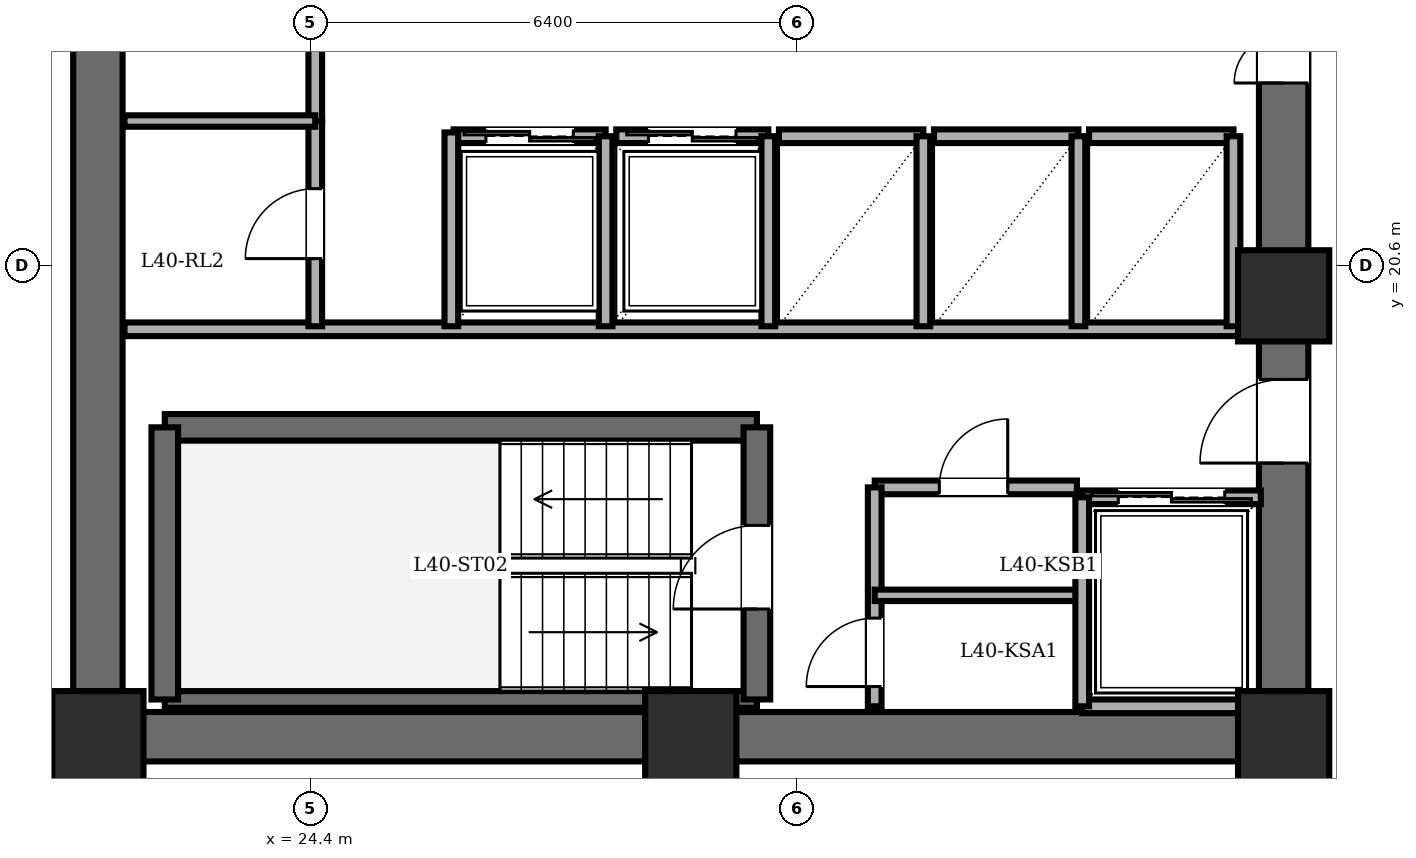
"""IFC4 building model, lengths in metres.
Left out: names, types, materials, properties, quantities, classifications, styles, units other than length and angle.
Written with IfcOpenShell. Run it as: python <this file> out.ifc"""

import sys

from ifc_helpers import new_model, si_unit, direction, frame, frame_2d, origin, origin_2d, place, context, subcontext, project, spatial, rectangle, extrude, element, fill, save


model = new_model("IFC4")
c1 = context("Model", 3, precision=1e-05, world=origin(), true_north=direction((0.0, 1.0)))
c2 = subcontext(c1, "Body", "Model", "MODEL_VIEW")
j1 = project(units=[si_unit("LENGTHUNIT", "METRE"), si_unit("PLANEANGLEUNIT", "RADIAN")], contexts=[c1])
p1 = place(None, origin())
s1 = spatial("IfcSite", under=j1, at=p1, CompositionType="ELEMENT")
p2 = place(p1, origin())
s2 = spatial("IfcBuilding", under=s1, at=p2, CompositionType="ELEMENT")
p3 = place(p2, frame((0.0, 0.0, 154.6)))
s3 = spatial("IfcBuildingStorey", under=s2, at=p3, CompositionType="ELEMENT", Elevation=154.6)
for number, where, z_axis, x_axis in (
    (1, (21.6, 14.4, 0.0), (0.0, 0.0, 1.0), (1.0, 0.0, 0.0)),
    (2, (29.4, 14.4, 0.0), (0.0, 0.0, 1.0), (1.0, 0.0, 0.0)),
    (3, (37.2, 14.4, 0.0), (0.0, 0.0, 1.0), (1.0, 0.0, 0.0)),
    (4, (37.2, 20.2, 0.0), (0.0, 0.0, 1.0), (1.0, 0.0, 0.0)),
):
    element("IfcColumn", number, at=place(p3, frame(where, z_axis=z_axis, x_axis=x_axis)), inside=s3, PredefinedType="COLUMN", context=c2, shape_type="SweptSolid", body=[
        extrude(rectangle(XDim=1.2, YDim=1.2, at=origin_2d()), origin(), (0.0, 0.0, 1.0), 3.6),
    ])
p4 = place(p3, frame((21.6, 14.4, 0.0), z_axis=(0.0, 0.0, 1.0), x_axis=(0.0, 1.0, 0.0)))
e5 = element("IfcWall", 5, at=p4, inside=s3, PredefinedType="SHEAR", context=c2, shape_type="SweptSolid", body=[
    extrude(rectangle(XDim=19.2, YDim=0.65, at=frame_2d((9.6, 0.0))), origin(), (0.0, 0.0, 1.0), 3.4),
])
p5 = place(p3, frame((37.2, 14.4, 0.0), z_axis=(0.0, 0.0, 1.0), x_axis=(-1.0, 0.0, 0.0)))
e6 = element("IfcWall", 6, at=p5, inside=s3, PredefinedType="SHEAR", context=c2, shape_type="SweptSolid", body=[
    extrude(rectangle(XDim=15.6, YDim=0.65, at=frame_2d((7.8, 0.0))), origin(), (0.0, 0.0, 1.0), 3.4),
])
p6 = place(p3, frame((37.2, 14.4, 0.0), z_axis=(0.0, 0.0, 1.0), x_axis=(0.0, 1.0, 0.0)))
e7 = element("IfcWall", 7, at=p6, inside=s3, PredefinedType="SHEAR", context=c2, shape_type="SweptSolid", body=[
    extrude(rectangle(XDim=19.2, YDim=0.65, at=frame_2d((9.6, 0.0))), origin(), (0.0, 0.0, 1.0), 3.4),
])
p7 = place(p6, frame((15.8, 0.0, 0.0)))
e8 = element("IfcOpeningElement", 8, at=p7, cuts=e7, PredefinedType="OPENING", context=c2, shape_type="SweptSolid", body=[
    extrude(rectangle(XDim=1.15, YDim=2.15, at=frame_2d((0.575, 1.075))), frame((0.0, 0.335, 0.0), z_axis=(0.0, -1.0, 0.0), x_axis=(1.0, 0.0, 0.0)), (0.0, 0.0, 1.0), 0.67),
])
p8 = place(p6, frame((3.6, 0.0, 0.0)))
e9 = element("IfcOpeningElement", 9, at=p8, cuts=e7, PredefinedType="OPENING", context=c2, shape_type="SweptSolid", body=[
    extrude(rectangle(XDim=1.1, YDim=2.15, at=frame_2d((0.55, 1.075))), frame((0.0, 0.335, 0.0), z_axis=(0.0, -1.0, 0.0), x_axis=(1.0, 0.0, 0.0)), (0.0, 0.0, 1.0), 0.67),
])
p9 = place(p6, frame((8.6, 0.0, 0.0)))
e10 = element("IfcOpeningElement", 10, at=p9, cuts=e7, PredefinedType="OPENING", context=c2, shape_type="SweptSolid", body=[
    extrude(rectangle(XDim=1.3, YDim=2.2, at=frame_2d((0.65, 1.1))), frame((0.0, 0.335, 0.0), z_axis=(0.0, -1.0, 0.0), x_axis=(1.0, 0.0, 0.0)), (0.0, 0.0, 1.0), 0.67),
])
p10 = place(p3, frame((22.48, 18.47, 0.0), z_axis=(0.0, 0.0, 1.0), x_axis=(1.0, 0.0, 0.0)))
e11 = element("IfcWall", 11, at=p10, inside=s3, PredefinedType="SOLIDWALL", context=c2, shape_type="SweptSolid", body=[
    extrude(rectangle(XDim=7.79, YDim=0.35, at=frame_2d((3.895, 0.0))), origin(), (0.0, 0.0, 1.0), 3.4),
])
p11 = place(p3, frame((22.48, 14.89, 0.0), z_axis=(0.0, 0.0, 1.0), x_axis=(1.0, 0.0, 0.0)))
e12 = element("IfcWall", 12, at=p11, inside=s3, PredefinedType="PARTITIONING", context=c2, shape_type="SweptSolid", body=[
    extrude(rectangle(XDim=7.79, YDim=0.22, at=frame_2d((3.895, 0.0))), origin(), (0.0, 0.0, 1.0), 3.4),
])
p12 = place(p3, frame((22.48, 14.89, 0.0), z_axis=(0.0, 0.0, 1.0), x_axis=(0.0, 1.0, 0.0)))
e13 = element("IfcWall", 13, at=p12, inside=s3, PredefinedType="SOLIDWALL", context=c2, shape_type="SweptSolid", body=[
    extrude(rectangle(XDim=3.58, YDim=0.35, at=frame_2d((1.79, 0.0))), origin(), (0.0, 0.0, 1.0), 3.4),
])
p13 = place(p3, frame((30.27, 14.89, 0.0), z_axis=(0.0, 0.0, 1.0), x_axis=(0.0, 1.0, 0.0)))
e14 = element("IfcWall", 14, at=p13, inside=s3, PredefinedType="SOLIDWALL", context=c2, shape_type="SweptSolid", body=[
    extrude(rectangle(XDim=3.58, YDim=0.35, at=frame_2d((1.79, 0.0))), origin(), (0.0, 0.0, 1.0), 3.4),
])
p14 = place(p13, frame((1.19, 0.0, 0.0)))
e15 = element("IfcOpeningElement", 15, at=p14, cuts=e14, PredefinedType="OPENING", context=c2, shape_type="SweptSolid", body=[
    extrude(rectangle(XDim=1.1, YDim=2.15, at=frame_2d((0.55, 1.075))), frame((0.0, 0.185, 0.0), z_axis=(0.0, -1.0, 0.0), x_axis=(1.0, 0.0, 0.0)), (0.0, 0.0, 1.0), 0.37),
])
p15 = place(p3, frame((21.95, 19.76, 0.0), z_axis=(0.0, 0.0, 1.0), x_axis=(1.0, 0.0, 0.0)))
e16 = element("IfcWall", 16, at=p15, inside=s3, PredefinedType="PARTITIONING", context=c2, shape_type="SweptSolid", body=[
    extrude(rectangle(XDim=14.87, YDim=0.18, at=frame_2d((7.435, 0.0))), origin(), (0.0, 0.0, 1.0), 3.4),
])
p16 = place(p3, frame((31.82, 17.68, 0.0), z_axis=(0.0, 0.0, 1.0), x_axis=(1.0, 0.0, 0.0)))
e17 = element("IfcWall", 17, at=p16, inside=s3, PredefinedType="PARTITIONING", context=c2, shape_type="SweptSolid", body=[
    extrude(rectangle(XDim=2.66, YDim=0.18, at=frame_2d((1.33, 0.0))), origin(), (0.0, 0.0, 1.0), 3.4),
])
p17 = place(p16, frame((0.85, 0.0, 0.0)))
e18 = element("IfcOpeningElement", 18, at=p17, cuts=e17, PredefinedType="OPENING", context=c2, shape_type="SweptSolid", body=[
    extrude(rectangle(XDim=0.9, YDim=2.05, at=frame_2d((0.45, 1.025))), frame((0.0, 0.1, 0.0), z_axis=(0.0, -1.0, 0.0), x_axis=(1.0, 0.0, 0.0)), (0.0, 0.0, 1.0), 0.2),
])
p18 = place(p3, frame((31.82, 14.8, 0.0), z_axis=(0.0, 0.0, 1.0), x_axis=(0.0, 1.0, 0.0)))
e19 = element("IfcWall", 19, at=p18, inside=s3, PredefinedType="PARTITIONING", context=c2, shape_type="SweptSolid", body=[
    extrude(rectangle(XDim=2.88, YDim=0.18, at=frame_2d((1.44, 0.0))), origin(), (0.0, 0.0, 1.0), 3.4),
])
p19 = place(p18, frame((0.26, 0.0, 0.0)))
e20 = element("IfcOpeningElement", 20, at=p19, cuts=e19, PredefinedType="OPENING", context=c2, shape_type="SweptSolid", body=[
    extrude(rectangle(XDim=0.9, YDim=2.05, at=frame_2d((0.45, 1.025))), frame((0.0, 0.1, 0.0), z_axis=(0.0, -1.0, 0.0), x_axis=(1.0, 0.0, 0.0)), (0.0, 0.0, 1.0), 0.2),
])
p20 = place(p3, frame((31.82, 16.26, 0.0), z_axis=(0.0, 0.0, 1.0), x_axis=(1.0, 0.0, 0.0)))
e21 = element("IfcWall", 21, at=p20, inside=s3, PredefinedType="PARTITIONING", context=c2, shape_type="SweptSolid", body=[
    extrude(rectangle(XDim=2.66, YDim=0.15, at=frame_2d((1.33, 0.0))), origin(), (0.0, 0.0, 1.0), 3.4),
])
p21 = place(p3, frame((34.55, 17.55, 0.0), z_axis=(0.0, 0.0, 1.0), x_axis=(1.0, 0.0, 0.0)))
e22 = element("IfcWall", 22, at=p21, inside=s3, PredefinedType="PARTITIONING", context=c2, shape_type="SweptSolid", body=[
    extrude(rectangle(XDim=2.35, YDim=0.18, at=frame_2d((1.175, 0.0))), origin(), (0.0, 0.0, 1.0), 3.4),
])
p22 = place(p21, frame((0.475, 0.0, 0.0)))
e23 = element("IfcOpeningElement", 23, at=p22, cuts=e22, PredefinedType="OPENING", context=c2, shape_type="SweptSolid", body=[
    extrude(rectangle(XDim=1.4, YDim=2.3, at=frame_2d((0.7, 1.15))), frame((0.0, 0.1, 0.0), z_axis=(0.0, -1.0, 0.0), x_axis=(1.0, 0.0, 0.0)), (0.0, 0.0, 1.0), 0.2),
])
p23 = place(p3, frame((36.9, 14.8, 0.0), z_axis=(0.0, 0.0, 1.0), x_axis=(-1.0, 0.0, 0.0)))
e24 = element("IfcWall", 24, at=p23, inside=s3, PredefinedType="PARTITIONING", context=c2, shape_type="SweptSolid", body=[
    extrude(rectangle(XDim=2.35, YDim=0.18, at=frame_2d((1.175, 0.0))), origin(), (0.0, 0.0, 1.0), 3.4),
])
p24 = place(p3, frame((34.55, 17.55, 0.0), z_axis=(0.0, 0.0, 1.0), x_axis=(0.0, -1.0, 0.0)))
e25 = element("IfcWall", 25, at=p24, inside=s3, PredefinedType="PARTITIONING", context=c2, shape_type="SweptSolid", body=[
    extrude(rectangle(XDim=2.75, YDim=0.18, at=frame_2d((1.375, 0.0))), origin(), (0.0, 0.0, 1.0), 3.4),
])
p25 = place(p3, frame((26.28, 22.3, 0.0), z_axis=(0.0, 0.0, 1.0), x_axis=(1.0, 0.0, 0.0)))
e26 = element("IfcWall", 26, at=p25, inside=s3, PredefinedType="PARTITIONING", context=c2, shape_type="SweptSolid", body=[
    extrude(rectangle(XDim=2.0, YDim=0.18, at=frame_2d((1.0, 0.0))), origin(), (0.0, 0.0, 1.0), 3.4),
])
p26 = place(p25, frame((0.425, 0.0, 0.0)))
e27 = element("IfcOpeningElement", 27, at=p26, cuts=e26, PredefinedType="OPENING", context=c2, shape_type="SweptSolid", body=[
    extrude(rectangle(XDim=1.15, YDim=2.2, at=frame_2d((0.575, 1.1))), frame((0.0, 0.1, 0.0), z_axis=(0.0, -1.0, 0.0), x_axis=(1.0, 0.0, 0.0)), (0.0, 0.0, 1.0), 0.2),
])
p27 = place(p3, frame((28.28, 19.8, 0.0), z_axis=(0.0, 0.0, 1.0), x_axis=(0.0, 1.0, 0.0)))
e28 = element("IfcWall", 28, at=p27, inside=s3, PredefinedType="PARTITIONING", context=c2, shape_type="SweptSolid", body=[
    extrude(rectangle(XDim=2.5, YDim=0.18, at=frame_2d((1.25, 0.0))), origin(), (0.0, 0.0, 1.0), 3.4),
])
p28 = place(p3, frame((28.42, 22.3, 0.0), z_axis=(0.0, 0.0, 1.0), x_axis=(1.0, 0.0, 0.0)))
e29 = element("IfcWall", 29, at=p28, inside=s3, PredefinedType="PARTITIONING", context=c2, shape_type="SweptSolid", body=[
    extrude(rectangle(XDim=2.0, YDim=0.18, at=frame_2d((1.0, 0.0))), origin(), (0.0, 0.0, 1.0), 3.4),
])
p29 = place(p28, frame((0.425, 0.0, 0.0)))
e30 = element("IfcOpeningElement", 30, at=p29, cuts=e29, PredefinedType="OPENING", context=c2, shape_type="SweptSolid", body=[
    extrude(rectangle(XDim=1.15, YDim=2.2, at=frame_2d((0.575, 1.1))), frame((0.0, 0.1, 0.0), z_axis=(0.0, -1.0, 0.0), x_axis=(1.0, 0.0, 0.0)), (0.0, 0.0, 1.0), 0.2),
])
p30 = place(p3, frame((30.42, 19.8, 0.0), z_axis=(0.0, 0.0, 1.0), x_axis=(0.0, 1.0, 0.0)))
e31 = element("IfcWall", 31, at=p30, inside=s3, PredefinedType="PARTITIONING", context=c2, shape_type="SweptSolid", body=[
    extrude(rectangle(XDim=2.5, YDim=0.18, at=frame_2d((1.25, 0.0))), origin(), (0.0, 0.0, 1.0), 3.4),
])
p31 = place(p3, frame((30.56, 22.3, 0.0), z_axis=(0.0, 0.0, 1.0), x_axis=(1.0, 0.0, 0.0)))
e32 = element("IfcWall", 32, at=p31, inside=s3, PredefinedType="PARTITIONING", context=c2, shape_type="SweptSolid", body=[
    extrude(rectangle(XDim=1.9, YDim=0.18, at=frame_2d((0.95, 0.0))), origin(), (0.0, 0.0, 1.0), 3.4),
])
p32 = place(p3, frame((32.46, 19.8, 0.0), z_axis=(0.0, 0.0, 1.0), x_axis=(0.0, 1.0, 0.0)))
e33 = element("IfcWall", 33, at=p32, inside=s3, PredefinedType="PARTITIONING", context=c2, shape_type="SweptSolid", body=[
    extrude(rectangle(XDim=2.5, YDim=0.18, at=frame_2d((1.25, 0.0))), origin(), (0.0, 0.0, 1.0), 3.4),
])
p33 = place(p3, frame((32.6, 22.3, 0.0), z_axis=(0.0, 0.0, 1.0), x_axis=(1.0, 0.0, 0.0)))
e34 = element("IfcWall", 34, at=p33, inside=s3, PredefinedType="PARTITIONING", context=c2, shape_type="SweptSolid", body=[
    extrude(rectangle(XDim=1.9, YDim=0.18, at=frame_2d((0.95, 0.0))), origin(), (0.0, 0.0, 1.0), 3.4),
])
p34 = place(p3, frame((34.5, 19.8, 0.0), z_axis=(0.0, 0.0, 1.0), x_axis=(0.0, 1.0, 0.0)))
e35 = element("IfcWall", 35, at=p34, inside=s3, PredefinedType="PARTITIONING", context=c2, shape_type="SweptSolid", body=[
    extrude(rectangle(XDim=2.5, YDim=0.18, at=frame_2d((1.25, 0.0))), origin(), (0.0, 0.0, 1.0), 3.4),
])
p35 = place(p3, frame((34.64, 22.3, 0.0), z_axis=(0.0, 0.0, 1.0), x_axis=(1.0, 0.0, 0.0)))
e36 = element("IfcWall", 36, at=p35, inside=s3, PredefinedType="PARTITIONING", context=c2, shape_type="SweptSolid", body=[
    extrude(rectangle(XDim=1.9, YDim=0.18, at=frame_2d((0.95, 0.0))), origin(), (0.0, 0.0, 1.0), 3.4),
])
p36 = place(p3, frame((36.54, 19.8, 0.0), z_axis=(0.0, 0.0, 1.0), x_axis=(0.0, 1.0, 0.0)))
e37 = element("IfcWall", 37, at=p36, inside=s3, PredefinedType="PARTITIONING", context=c2, shape_type="SweptSolid", body=[
    extrude(rectangle(XDim=2.5, YDim=0.18, at=frame_2d((1.25, 0.0))), origin(), (0.0, 0.0, 1.0), 3.4),
])
p37 = place(p3, frame((24.46, 22.5, 0.0), z_axis=(0.0, 0.0, 1.0), x_axis=(0.0, 1.0, 0.0)))
e38 = element("IfcWall", 38, at=p37, inside=s3, PredefinedType="PARTITIONING", context=c2, shape_type="SweptSolid", body=[
    extrude(rectangle(XDim=5.0, YDim=0.18, at=frame_2d((2.5, 0.0))), origin(), (0.0, 0.0, 1.0), 3.4),
])
p38 = place(p37, frame((2.04, 0.0, 0.0)))
e39 = element("IfcOpeningElement", 39, at=p38, cuts=e38, PredefinedType="OPENING", context=c2, shape_type="SweptSolid", body=[
    extrude(rectangle(XDim=0.92, YDim=2.1, at=frame_2d((0.46, 1.05))), frame((0.0, 0.1, 0.0), z_axis=(0.0, -1.0, 0.0), x_axis=(1.0, 0.0, 0.0)), (0.0, 0.0, 1.0), 0.2),
])
p39 = place(p3, frame((24.46, 19.8, 0.0), z_axis=(0.0, 0.0, 1.0), x_axis=(0.0, 1.0, 0.0)))
e40 = element("IfcWall", 40, at=p39, inside=s3, PredefinedType="PARTITIONING", context=c2, shape_type="SweptSolid", body=[
    extrude(rectangle(XDim=2.7, YDim=0.18, at=frame_2d((1.35, 0.0))), origin(), (0.0, 0.0, 1.0), 3.4),
])
p40 = place(p39, frame((0.89, 0.0, 0.0)))
e41 = element("IfcOpeningElement", 41, at=p40, cuts=e40, PredefinedType="OPENING", context=c2, shape_type="SweptSolid", body=[
    extrude(rectangle(XDim=0.92, YDim=2.1, at=frame_2d((0.46, 1.05))), frame((0.0, 0.1, 0.0), z_axis=(0.0, -1.0, 0.0), x_axis=(1.0, 0.0, 0.0)), (0.0, 0.0, 1.0), 0.2),
])
p41 = place(p3, frame((21.95, 22.5, 0.0), z_axis=(0.0, 0.0, 1.0), x_axis=(1.0, 0.0, 0.0)))
e42 = element("IfcWall", 42, at=p41, inside=s3, PredefinedType="PARTITIONING", context=c2, shape_type="SweptSolid", body=[
    extrude(rectangle(XDim=2.51, YDim=0.15, at=frame_2d((1.255, 0.0))), origin(), (0.0, 0.0, 1.0), 3.4),
])
p42 = place(p3, frame((26.25, 19.8, 0.0), z_axis=(0.0, 0.0, 1.0), x_axis=(0.0, 1.0, 0.0)))
e43 = element("IfcWall", 43, at=p42, inside=s3, PredefinedType="PARTITIONING", context=c2, shape_type="SweptSolid", body=[
    extrude(rectangle(XDim=2.55, YDim=0.18, at=frame_2d((1.275, 0.0))), origin(), (0.0, 0.0, 1.0), 3.4),
])
p43 = place(p3, frame((13.8, 14.18, 0.0), z_axis=(0.0, 0.0, 1.0), x_axis=(1.0, 0.0, 0.0)))
e44 = element("IfcWall", 44, at=p43, inside=s3, PredefinedType="PARTITIONING", context=c2, shape_type="SweptSolid", body=[
    extrude(rectangle(XDim=7.68, YDim=0.18, at=frame_2d((3.84, 0.0))), origin(), (0.0, 0.0, 1.0), 3.4),
])
p44 = place(p43, frame((3.72, 0.0, 0.0)))
e45 = element("IfcOpeningElement", 45, at=p44, cuts=e44, PredefinedType="OPENING", context=c2, shape_type="SweptSolid", body=[
    extrude(rectangle(XDim=0.92, YDim=2.1, at=frame_2d((0.46, 1.05))), frame((0.0, 0.1, 0.0), z_axis=(0.0, -1.0, 0.0), x_axis=(1.0, 0.0, 0.0)), (0.0, 0.0, 1.0), 0.2),
])
p45 = place(p14, origin())
e46 = element("IfcDoor", 46, at=p45, inside=s3, OperationType="SINGLE_SWING_LEFT", PredefinedType="DOOR", context=c2, shape_type="SweptSolid", body=[
    extrude(rectangle(XDim=1.1, YDim=2.15, at=frame_2d((0.55, 1.075))), frame((0.0, 0.025, 0.0), z_axis=(0.0, -1.0, 0.0), x_axis=(1.0, 0.0, 0.0)), (0.0, 0.0, 1.0), 0.05),
])
fill(e15, e46)
p46 = place(p8, origin())
e47 = element("IfcDoor", 47, at=p46, inside=s3, OperationType="SINGLE_SWING_LEFT", PredefinedType="DOOR", context=c2, shape_type="SweptSolid", body=[
    extrude(rectangle(XDim=1.1, YDim=2.15, at=frame_2d((0.55, 1.075))), frame((0.0, 0.025, 0.0), z_axis=(0.0, -1.0, 0.0), x_axis=(1.0, 0.0, 0.0)), (0.0, 0.0, 1.0), 0.05),
])
fill(e9, e47)
p47 = place(p17, origin())
e48 = element("IfcDoor", 48, at=p47, inside=s3, OperationType="SINGLE_SWING_RIGHT", PredefinedType="DOOR", context=c2, shape_type="SweptSolid", body=[
    extrude(rectangle(XDim=0.9, YDim=2.05, at=frame_2d((0.45, 1.025))), frame((0.0, 0.025, 0.0), z_axis=(0.0, -1.0, 0.0), x_axis=(1.0, 0.0, 0.0)), (0.0, 0.0, 1.0), 0.05),
])
fill(e18, e48)
p48 = place(p19, origin())
e49 = element("IfcDoor", 49, at=p48, inside=s3, OperationType="SINGLE_SWING_LEFT", PredefinedType="DOOR", context=c2, shape_type="SweptSolid", body=[
    extrude(rectangle(XDim=0.9, YDim=2.05, at=frame_2d((0.45, 1.025))), frame((0.0, 0.025, 0.0), z_axis=(0.0, -1.0, 0.0), x_axis=(1.0, 0.0, 0.0)), (0.0, 0.0, 1.0), 0.05),
])
fill(e20, e49)
p49 = place(p22, origin())
e50 = element("IfcDoor", 50, at=p49, inside=s3, OperationType="DOUBLE_DOOR_SLIDING", PredefinedType="DOOR", context=c2, shape_type="SweptSolid", body=[
    extrude(rectangle(XDim=1.4, YDim=2.3, at=frame_2d((0.7, 1.15))), frame((0.0, 0.025, 0.0), z_axis=(0.0, -1.0, 0.0), x_axis=(1.0, 0.0, 0.0)), (0.0, 0.0, 1.0), 0.05),
])
fill(e23, e50)
p50 = place(p26, origin())
e51 = element("IfcDoor", 51, at=p50, inside=s3, OperationType="DOUBLE_DOOR_SLIDING", PredefinedType="DOOR", context=c2, shape_type="SweptSolid", body=[
    extrude(rectangle(XDim=1.15, YDim=2.2, at=frame_2d((0.575, 1.1))), frame((0.0, 0.025, 0.0), z_axis=(0.0, -1.0, 0.0), x_axis=(1.0, 0.0, 0.0)), (0.0, 0.0, 1.0), 0.05),
])
fill(e27, e51)
p51 = place(p29, origin())
e52 = element("IfcDoor", 52, at=p51, inside=s3, OperationType="DOUBLE_DOOR_SLIDING", PredefinedType="DOOR", context=c2, shape_type="SweptSolid", body=[
    extrude(rectangle(XDim=1.15, YDim=2.2, at=frame_2d((0.575, 1.1))), frame((0.0, 0.025, 0.0), z_axis=(0.0, -1.0, 0.0), x_axis=(1.0, 0.0, 0.0)), (0.0, 0.0, 1.0), 0.05),
])
fill(e30, e52)
p52 = place(p40, origin())
e53 = element("IfcDoor", 53, at=p52, inside=s3, OperationType="SINGLE_SWING_LEFT", PredefinedType="DOOR", context=c2, shape_type="SweptSolid", body=[
    extrude(rectangle(XDim=0.92, YDim=2.1, at=frame_2d((0.46, 1.05))), frame((0.0, 0.025, 0.0), z_axis=(0.0, -1.0, 0.0), x_axis=(1.0, 0.0, 0.0)), (0.0, 0.0, 1.0), 0.05),
])
fill(e41, e53)
p53 = place(p9, origin())
e54 = element("IfcDoor", 54, at=p53, inside=s3, OperationType="DOUBLE_DOOR_SINGLE_SWING", PredefinedType="DOOR", context=c2, shape_type="SweptSolid", body=[
    extrude(rectangle(XDim=1.3, YDim=2.2, at=frame_2d((0.65, 1.1))), frame((0.0, 0.025, 0.0), z_axis=(0.0, -1.0, 0.0), x_axis=(1.0, 0.0, 0.0)), (0.0, 0.0, 1.0), 0.05),
])
fill(e10, e54)
save(model, sys.argv[1])
